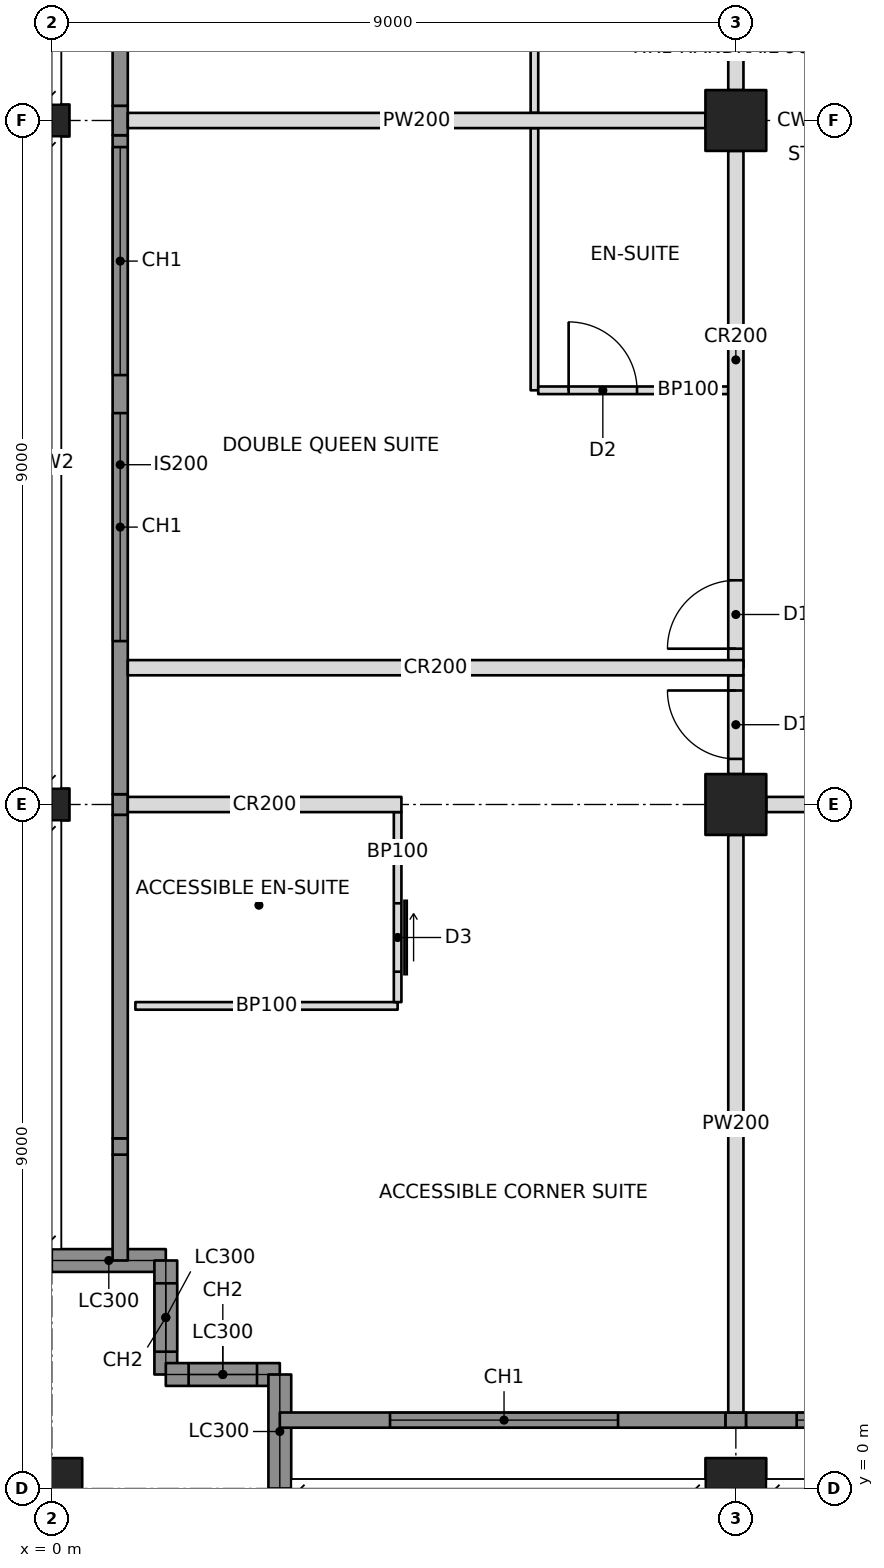
"""IFC4 building model, lengths in metres.
Left out: names, types, materials, properties, quantities, classifications, styles, units other than length and angle.
Written with IfcOpenShell. Run it as: python <this file> out.ifc"""

import sys

from ifc_helpers import new_model, si_unit, direction, frame, frame_2d, origin, origin_with_axes, origin_2d, place, context, subcontext, project, spatial, rectangle, hollow_rectangle, i_section, extrude, element, fill, save


model = new_model("IFC4")
c1 = context("Model", 3, precision=1e-05, world=origin(), true_north=direction((0.0, 1.0)))
c2 = subcontext(c1, "Body", "Model", "MODEL_VIEW")
j1 = project(units=[si_unit("LENGTHUNIT", "METRE"), si_unit("PLANEANGLEUNIT", "RADIAN")], contexts=[c1])
p1 = place(None, origin())
s1 = spatial("IfcSite", under=j1, at=p1, CompositionType="ELEMENT")
p2 = place(p1, origin())
s2 = spatial("IfcBuilding", under=s1, at=p2, CompositionType="ELEMENT")
p3 = place(p2, frame((0.0, 0.0, 226.6)))
s3 = spatial("IfcBuildingStorey", under=s2, at=p3, CompositionType="ELEMENT", Elevation=226.6)
p4 = place(p3, origin_with_axes())
e1 = element("IfcColumn", 1, at=p4, inside=s3, PredefinedType="COLUMN", context=c2, shape_type="SweptSolid", body=[
    extrude(hollow_rectangle(XDim=0.8, YDim=0.8, WallThickness=0.05, at=origin_2d()), origin(), (0.0, 0.0, 1.0), 3.6),
])
for number, where, z_axis, x_axis in (
    (2, (0.0, 9.0, 0.0), (0.0, 0.0, 1.0), (0.0, 1.0, 0.0)),
    (3, (0.0, 18.0, 0.0), (0.0, 0.0, 1.0), (0.0, 1.0, 0.0)),
):
    element("IfcColumn", number, at=place(p3, frame(where, z_axis=z_axis, x_axis=x_axis)), inside=s3, PredefinedType="COLUMN", context=c2, shape_type="SweptSolid", body=[
        extrude(i_section(OverallWidth=0.422, OverallDepth=0.465, WebThickness=0.045, FlangeThickness=0.073, at=origin_2d()), origin(), (0.0, 0.0, 1.0), 3.6),
    ])
p5 = place(p3, frame((9.0, 0.0, 0.0), z_axis=(0.0, 0.0, 1.0), x_axis=(1.0, 0.0, 0.0)))
e4 = element("IfcColumn", 4, at=p5, inside=s3, PredefinedType="COLUMN", context=c2, shape_type="SweptSolid", body=[
    extrude(hollow_rectangle(XDim=0.8, YDim=0.8, WallThickness=0.05, at=origin_2d()), origin(), (0.0, 0.0, 1.0), 3.6),
])
for number, where, z_axis, x_axis in (
    (5, (9.0, 9.0, 0.0), (0.0, 0.0, 1.0), (1.0, 0.0, 0.0)),
    (6, (9.0, 18.0, 0.0), (0.0, 0.0, 1.0), (1.0, 0.0, 0.0)),
):
    element("IfcColumn", number, at=place(p3, frame(where, z_axis=z_axis, x_axis=x_axis)), inside=s3, PredefinedType="COLUMN", context=c2, shape_type="SweptSolid", body=[
        extrude(hollow_rectangle(XDim=0.8, YDim=0.8, WallThickness=0.1, at=origin_2d()), origin(), (0.0, 0.0, 1.0), 3.6),
    ])
p6 = place(p3, frame((0.0, 3.0, 0.0), z_axis=(0.0, 0.0, 1.0), x_axis=(1.0, 0.0, 0.0)))
e7 = element("IfcWall", 7, at=p6, inside=s3, PredefinedType="SOLIDWALL", context=c2, shape_type="SweptSolid", body=[
    extrude(rectangle(XDim=1.5, YDim=0.3, at=frame_2d((0.75, 0.0))), origin(), (0.0, 0.0, 1.0), 2.62),
])
p7 = place(p3, frame((1.5, 3.0, 0.0), z_axis=(0.0, 0.0, 1.0), x_axis=(0.0, -1.0, 0.0)))
e8 = element("IfcWall", 8, at=p7, inside=s3, PredefinedType="SOLIDWALL", context=c2, shape_type="SweptSolid", body=[
    extrude(rectangle(XDim=1.5, YDim=0.3, at=frame_2d((0.75, 0.0))), origin(), (0.0, 0.0, 1.0), 3.4),
])
p8 = place(p7, frame((0.3, 0.0, 0.6)))
e9 = element("IfcOpeningElement", 9, at=p8, cuts=e8, PredefinedType="OPENING", context=c2, shape_type="SweptSolid", body=[
    extrude(rectangle(XDim=0.9, YDim=2.2, at=frame_2d((0.45, 1.1))), frame((0.0, 0.16, 0.0), z_axis=(0.0, -1.0, 0.0), x_axis=(1.0, 0.0, 0.0)), (0.0, 0.0, 1.0), 0.32),
])
p9 = place(p3, frame((1.5, 1.5, 0.0), z_axis=(0.0, 0.0, 1.0), x_axis=(1.0, 0.0, 0.0)))
e10 = element("IfcWall", 10, at=p9, inside=s3, PredefinedType="SOLIDWALL", context=c2, shape_type="SweptSolid", body=[
    extrude(rectangle(XDim=1.5, YDim=0.3, at=frame_2d((0.75, 0.0))), origin(), (0.0, 0.0, 1.0), 3.4),
])
p10 = place(p9, frame((0.3, 0.0, 0.6)))
e11 = element("IfcOpeningElement", 11, at=p10, cuts=e10, PredefinedType="OPENING", context=c2, shape_type="SweptSolid", body=[
    extrude(rectangle(XDim=0.9, YDim=2.2, at=frame_2d((0.45, 1.1))), frame((0.0, 0.16, 0.0), z_axis=(0.0, -1.0, 0.0), x_axis=(1.0, 0.0, 0.0)), (0.0, 0.0, 1.0), 0.32),
])
p11 = place(p3, frame((3.0, 1.5, 0.0), z_axis=(0.0, 0.0, 1.0), x_axis=(0.0, -1.0, 0.0)))
e12 = element("IfcWall", 12, at=p11, inside=s3, PredefinedType="SOLIDWALL", context=c2, shape_type="SweptSolid", body=[
    extrude(rectangle(XDim=1.5, YDim=0.3, at=frame_2d((0.75, 0.0))), origin(), (0.0, 0.0, 1.0), 2.62),
])
p12 = place(p3, frame((3.0, 0.9, 0.0), z_axis=(0.0, 0.0, 1.0), x_axis=(1.0, 0.0, 0.0)))
e13 = element("IfcWall", 13, at=p12, inside=s3, PredefinedType="SOLIDWALL", context=c2, shape_type="SweptSolid", body=[
    extrude(rectangle(XDim=5.865, YDim=0.2, at=frame_2d((2.932, 0.0))), origin(), (0.0, 0.0, 1.0), 3.4),
])
p13 = place(p12, frame((1.45, 0.0, 0.6)))
e14 = element("IfcOpeningElement", 14, at=p13, cuts=e13, PredefinedType="OPENING", context=c2, shape_type="SweptSolid", body=[
    extrude(rectangle(XDim=3.0, YDim=2.2, at=frame_2d((1.5, 1.1))), frame((0.0, 0.11, 0.0), z_axis=(0.0, -1.0, 0.0), x_axis=(1.0, 0.0, 0.0)), (0.0, 0.0, 1.0), 0.22),
])
p14 = place(p3, frame((0.9, 3.0, 0.0), z_axis=(0.0, 0.0, 1.0), x_axis=(0.0, 1.0, 0.0)))
e15 = element("IfcWall", 15, at=p14, inside=s3, PredefinedType="SOLIDWALL", context=c2, shape_type="SweptSolid", body=[
    extrude(rectangle(XDim=1.393, YDim=0.2, at=frame_2d((0.696, 0.0))), origin(), (0.0, 0.0, 1.0), 3.4),
])
p15 = place(p3, frame((1.0, 9.0, 0.0), z_axis=(0.0, 0.0, 1.0), x_axis=(1.0, 0.0, 0.0)))
e16 = element("IfcWall", 16, at=p15, inside=s3, PredefinedType="PARTITIONING", context=c2, shape_type="SweptSolid", body=[
    extrude(rectangle(XDim=3.6, YDim=0.2, at=frame_2d((1.8, 0.0))), origin(), (0.0, 0.0, 1.0), 2.638),
])
p16 = place(p3, frame((9.4, 9.0, 0.0), z_axis=(0.0, 0.0, 1.0), x_axis=(1.0, 0.0, 0.0)))
e17 = element("IfcWall", 17, at=p16, inside=s3, PredefinedType="PARTITIONING", context=c2, shape_type="SweptSolid", body=[
    extrude(rectangle(XDim=2.95, YDim=0.2, at=frame_2d((1.475, 0.0))), origin(), (0.0, 0.0, 1.0), 2.605),
])
p17 = place(p3, frame((9.0, 10.8, 0.0), z_axis=(0.0, 0.0, 1.0), x_axis=(0.0, 1.0, 0.0)))
e18 = element("IfcWall", 18, at=p17, inside=s3, PredefinedType="PARTITIONING", context=c2, shape_type="SweptSolid", body=[
    extrude(rectangle(XDim=6.8, YDim=0.2, at=frame_2d((3.4, 0.0))), origin(), (0.0, 0.0, 1.0), 2.605),
])
p18 = place(p17, frame((0.25, 0.0, 0.0)))
e19 = element("IfcOpeningElement", 19, at=p18, cuts=e18, PredefinedType="OPENING", context=c2, shape_type="SweptSolid", body=[
    extrude(rectangle(XDim=0.9, YDim=2.1, at=frame_2d((0.45, 1.05))), frame((0.0, 0.11, 0.0), z_axis=(0.0, -1.0, 0.0), x_axis=(1.0, 0.0, 0.0)), (0.0, 0.0, 1.0), 0.22),
])
p19 = place(p3, frame((9.0, 18.4, 0.0), z_axis=(0.0, 0.0, 1.0), x_axis=(0.0, 1.0, 0.0)))
e20 = element("IfcWall", 20, at=p19, inside=s3, PredefinedType="PARTITIONING", context=c2, shape_type="SweptSolid", body=[
    extrude(rectangle(XDim=8.2, YDim=0.2, at=frame_2d((4.1, 0.0))), origin(), (0.0, 0.0, 1.0), 2.605),
])
p20 = place(p19, frame((5.65, 0.0, 0.0)))
e21 = element("IfcOpeningElement", 21, at=p20, cuts=e20, PredefinedType="OPENING", context=c2, shape_type="SweptSolid", body=[
    extrude(rectangle(XDim=0.9, YDim=2.1, at=frame_2d((0.45, 1.05))), frame((0.0, 0.11, 0.0), z_axis=(0.0, -1.0, 0.0), x_axis=(1.0, 0.0, 0.0)), (0.0, 0.0, 1.0), 0.22),
])
p21 = place(p3, frame((1.0, 10.8, 0.0), z_axis=(0.0, 0.0, 1.0), x_axis=(1.0, 0.0, 0.0)))
e22 = element("IfcWall", 22, at=p21, inside=s3, PredefinedType="PARTITIONING", context=c2, shape_type="SweptSolid", body=[
    extrude(rectangle(XDim=8.1, YDim=0.2, at=frame_2d((4.05, 0.0))), origin(), (0.0, 0.0, 1.0), 2.604),
])
p22 = place(p3, frame((9.0, 8.6, 0.0), z_axis=(0.0, 0.0, 1.0), x_axis=(0.0, -1.0, 0.0)))
e23 = element("IfcWall", 23, at=p22, inside=s3, PredefinedType="PARTITIONING", context=c2, shape_type="SweptSolid", body=[
    extrude(rectangle(XDim=7.6, YDim=0.2, at=frame_2d((3.8, 0.0))), origin(), (0.0, 0.0, 1.0), 2.638),
])
p23 = place(p3, frame((1.1, 6.35, 0.0), z_axis=(0.0, 0.0, 1.0), x_axis=(1.0, 0.0, 0.0)))
e24 = element("IfcWall", 24, at=p23, inside=s3, PredefinedType="PARTITIONING", context=c2, shape_type="SweptSolid", body=[
    extrude(rectangle(XDim=3.45, YDim=0.1, at=frame_2d((1.725, 0.0))), origin(), (0.0, 0.0, 1.0), 3.4),
])
p24 = place(p3, frame((4.55, 8.9, 0.0), z_axis=(0.0, 0.0, 1.0), x_axis=(0.0, -1.0, 0.0)))
e25 = element("IfcWall", 25, at=p24, inside=s3, PredefinedType="PARTITIONING", context=c2, shape_type="SweptSolid", body=[
    extrude(rectangle(XDim=2.5, YDim=0.1, at=frame_2d((1.25, 0.0))), origin(), (0.0, 0.0, 1.0), 2.638),
])
p25 = place(p24, frame((1.2, 0.0, 0.0)))
e26 = element("IfcOpeningElement", 26, at=p25, cuts=e25, PredefinedType="OPENING", context=c2, shape_type="SweptSolid", body=[
    extrude(rectangle(XDim=0.9, YDim=2.1, at=frame_2d((0.45, 1.05))), frame((0.0, 0.06, 0.0), z_axis=(0.0, -1.0, 0.0), x_axis=(1.0, 0.0, 0.0)), (0.0, 0.0, 1.0), 0.12),
])
p26 = place(p3, frame((8.6, 18.0, 0.0), z_axis=(0.0, 0.0, 1.0), x_axis=(-1.0, 0.0, 0.0)))
e27 = element("IfcWall", 27, at=p26, inside=s3, PredefinedType="PARTITIONING", context=c2, shape_type="SweptSolid", body=[
    extrude(rectangle(XDim=7.6, YDim=0.2, at=frame_2d((3.8, 0.0))), origin(), (0.0, 0.0, 1.0), 2.605),
])
p27 = place(p3, frame((6.35, 14.45, 0.0), z_axis=(0.0, 0.0, 1.0), x_axis=(0.0, 1.0, 0.0)))
e28 = element("IfcWall", 28, at=p27, inside=s3, PredefinedType="PARTITIONING", context=c2, shape_type="SweptSolid", body=[
    extrude(rectangle(XDim=3.45, YDim=0.1, at=frame_2d((1.725, 0.0))), origin(), (0.0, 0.0, 1.0), 2.604),
])
p28 = place(p3, frame((8.9, 14.45, 0.0), z_axis=(0.0, 0.0, 1.0), x_axis=(-1.0, 0.0, 0.0)))
e29 = element("IfcWall", 29, at=p28, inside=s3, PredefinedType="PARTITIONING", context=c2, shape_type="SweptSolid", body=[
    extrude(rectangle(XDim=2.5, YDim=0.1, at=frame_2d((1.25, 0.0))), origin(), (0.0, 0.0, 1.0), 2.604),
])
p29 = place(p28, frame((1.2, 0.0, 0.0)))
e30 = element("IfcOpeningElement", 30, at=p29, cuts=e29, PredefinedType="OPENING", context=c2, shape_type="SweptSolid", body=[
    extrude(rectangle(XDim=0.9, YDim=2.1, at=frame_2d((0.45, 1.05))), frame((0.0, 0.06, 0.0), z_axis=(0.0, -1.0, 0.0), x_axis=(1.0, 0.0, 0.0)), (0.0, 0.0, 1.0), 0.12),
])
p30 = place(p3, frame((6.35, 18.1, 0.0), z_axis=(0.0, 0.0, 1.0), x_axis=(0.0, 1.0, 0.0)))
e31 = element("IfcWall", 31, at=p30, inside=s3, PredefinedType="PARTITIONING", context=c2, shape_type="SweptSolid", body=[
    extrude(rectangle(XDim=3.45, YDim=0.1, at=frame_2d((1.725, 0.0))), origin(), (0.0, 0.0, 1.0), 2.604),
])
p31 = place(p3, frame((9.0, 9.4, 0.0), z_axis=(0.0, 0.0, 1.0), x_axis=(0.0, 1.0, 0.0)))
e32 = element("IfcWall", 32, at=p31, inside=s3, PredefinedType="PARTITIONING", context=c2, shape_type="SweptSolid", body=[
    extrude(rectangle(XDim=1.3, YDim=0.2, at=frame_2d((0.65, 0.0))), origin(), (0.0, 0.0, 1.0), 2.605),
])
p32 = place(p31, frame((0.2, 0.0, 0.0)))
e33 = element("IfcOpeningElement", 33, at=p32, cuts=e32, PredefinedType="OPENING", context=c2, shape_type="SweptSolid", body=[
    extrude(rectangle(XDim=0.9, YDim=2.1, at=frame_2d((0.45, 1.05))), frame((0.0, 0.11, 0.0), z_axis=(0.0, -1.0, 0.0), x_axis=(1.0, 0.0, 0.0)), (0.0, 0.0, 1.0), 0.22),
])
p33 = place(p3, frame((8.865, 0.9, 0.0), z_axis=(0.0, 0.0, 1.0), x_axis=(1.0, 0.0, 0.0)))
e34 = element("IfcWall", 34, at=p33, inside=s3, PredefinedType="SOLIDWALL", context=c2, shape_type="SweptSolid", body=[
    extrude(rectangle(XDim=0.271, YDim=0.2, at=frame_2d((0.135, 0.0))), origin(), (0.0, 0.0, 1.0), 2.638),
])
p34 = place(p3, frame((9.135, 0.9, 0.0), z_axis=(0.0, 0.0, 1.0), x_axis=(1.0, 0.0, 0.0)))
e35 = element("IfcWall", 35, at=p34, inside=s3, PredefinedType="SOLIDWALL", context=c2, shape_type="SweptSolid", body=[
    extrude(rectangle(XDim=8.671, YDim=0.2, at=frame_2d((4.335, 0.0))), origin(), (0.0, 0.0, 1.0), 3.4),
])
p35 = place(p34, frame((0.665, 0.0, 0.6)))
e36 = element("IfcOpeningElement", 36, at=p35, cuts=e35, PredefinedType="OPENING", context=c2, shape_type="SweptSolid", body=[
    extrude(rectangle(XDim=3.0, YDim=2.2, at=frame_2d((1.5, 1.1))), frame((0.0, 0.11, 0.0), z_axis=(0.0, -1.0, 0.0), x_axis=(1.0, 0.0, 0.0)), (0.0, 0.0, 1.0), 0.22),
])
p36 = place(p34, frame((5.065, 0.0, 0.6)))
e37 = element("IfcOpeningElement", 37, at=p36, cuts=e35, PredefinedType="OPENING", context=c2, shape_type="SweptSolid", body=[
    extrude(rectangle(XDim=3.0, YDim=2.2, at=frame_2d((1.5, 1.1))), frame((0.0, 0.11, 0.0), z_axis=(0.0, -1.0, 0.0), x_axis=(1.0, 0.0, 0.0)), (0.0, 0.0, 1.0), 0.22),
])
p37 = place(p3, frame((0.9, 4.393, 0.0), z_axis=(0.0, 0.0, 1.0), x_axis=(0.0, 1.0, 0.0)))
e38 = element("IfcWall", 38, at=p37, inside=s3, PredefinedType="SOLIDWALL", context=c2, shape_type="SweptSolid", body=[
    extrude(rectangle(XDim=0.215, YDim=0.2, at=frame_2d((0.107, 0.0))), origin(), (0.0, 0.0, 1.0), 2.861),
])
p38 = place(p3, frame((0.9, 4.607, 0.0), z_axis=(0.0, 0.0, 1.0), x_axis=(0.0, 1.0, 0.0)))
e39 = element("IfcWall", 39, at=p38, inside=s3, PredefinedType="SOLIDWALL", context=c2, shape_type="SweptSolid", body=[
    extrude(rectangle(XDim=4.257, YDim=0.2, at=frame_2d((2.129, 0.0))), origin(), (0.0, 0.0, 1.0), 3.4),
])
p39 = place(p3, frame((0.9, 8.865, 0.0), z_axis=(0.0, 0.0, 1.0), x_axis=(0.0, 1.0, 0.0)))
e40 = element("IfcWall", 40, at=p39, inside=s3, PredefinedType="SOLIDWALL", context=c2, shape_type="SweptSolid", body=[
    extrude(rectangle(XDim=0.271, YDim=0.2, at=frame_2d((0.135, 0.0))), origin(), (0.0, 0.0, 1.0), 2.638),
])
p40 = place(p3, frame((0.9, 9.135, 0.0), z_axis=(0.0, 0.0, 1.0), x_axis=(0.0, 1.0, 0.0)))
e41 = element("IfcWall", 41, at=p40, inside=s3, PredefinedType="SOLIDWALL", context=c2, shape_type="SweptSolid", body=[
    extrude(rectangle(XDim=8.671, YDim=0.2, at=frame_2d((4.335, 0.0))), origin(), (0.0, 0.0, 1.0), 3.4),
])
p41 = place(p40, frame((2.015, 0.0, 0.6)))
e42 = element("IfcOpeningElement", 42, at=p41, cuts=e41, PredefinedType="OPENING", context=c2, shape_type="SweptSolid", body=[
    extrude(rectangle(XDim=3.0, YDim=2.2, at=frame_2d((1.5, 1.1))), frame((0.0, 0.11, 0.0), z_axis=(0.0, -1.0, 0.0), x_axis=(1.0, 0.0, 0.0)), (0.0, 0.0, 1.0), 0.22),
])
p42 = place(p40, frame((5.515, 0.0, 0.6)))
e43 = element("IfcOpeningElement", 43, at=p42, cuts=e41, PredefinedType="OPENING", context=c2, shape_type="SweptSolid", body=[
    extrude(rectangle(XDim=3.0, YDim=2.2, at=frame_2d((1.5, 1.1))), frame((0.0, 0.11, 0.0), z_axis=(0.0, -1.0, 0.0), x_axis=(1.0, 0.0, 0.0)), (0.0, 0.0, 1.0), 0.22),
])
p43 = place(p3, frame((0.9, 17.806, 0.0), z_axis=(0.0, 0.0, 1.0), x_axis=(0.0, 1.0, 0.0)))
e44 = element("IfcWall", 44, at=p43, inside=s3, PredefinedType="SOLIDWALL", context=c2, shape_type="SweptSolid", body=[
    extrude(rectangle(XDim=0.388, YDim=0.2, at=frame_2d((0.194, 0.0))), origin(), (0.0, 0.0, 1.0), 2.604),
])
p44 = place(p3, frame((0.9, 18.194, 0.0), z_axis=(0.0, 0.0, 1.0), x_axis=(0.0, 1.0, 0.0)))
e45 = element("IfcWall", 45, at=p44, inside=s3, PredefinedType="SOLIDWALL", context=c2, shape_type="SweptSolid", body=[
    extrude(rectangle(XDim=5.806, YDim=0.2, at=frame_2d((2.903, 0.0))), origin(), (0.0, 0.0, 1.0), 3.4),
])
p45 = place(p44, frame((1.356, 0.0, 0.6)))
e46 = element("IfcOpeningElement", 46, at=p45, cuts=e45, PredefinedType="OPENING", context=c2, shape_type="SweptSolid", body=[
    extrude(rectangle(XDim=3.0, YDim=2.2, at=frame_2d((1.5, 1.1))), frame((0.0, 0.11, 0.0), z_axis=(0.0, -1.0, 0.0), x_axis=(1.0, 0.0, 0.0)), (0.0, 0.0, 1.0), 0.22),
])
p46 = place(p8, origin())
e47 = element("IfcWindow", 47, at=p46, inside=s3, PartitioningType="SINGLE_PANEL", PredefinedType="WINDOW", context=c2, shape_type="SweptSolid", body=[
    extrude(rectangle(XDim=0.9, YDim=2.2, at=frame_2d((0.45, 1.1))), frame((0.0, 0.03, 0.0), z_axis=(0.0, -1.0, 0.0), x_axis=(1.0, 0.0, 0.0)), (0.0, 0.0, 1.0), 0.06),
])
fill(e9, e47)
p47 = place(p10, origin())
e48 = element("IfcWindow", 48, at=p47, inside=s3, PartitioningType="SINGLE_PANEL", PredefinedType="WINDOW", context=c2, shape_type="SweptSolid", body=[
    extrude(rectangle(XDim=0.9, YDim=2.2, at=frame_2d((0.45, 1.1))), frame((0.0, 0.03, 0.0), z_axis=(0.0, -1.0, 0.0), x_axis=(1.0, 0.0, 0.0)), (0.0, 0.0, 1.0), 0.06),
])
fill(e11, e48)
p48 = place(p13, origin())
e49 = element("IfcWindow", 49, at=p48, inside=s3, PartitioningType="TRIPLE_PANEL_VERTICAL", PredefinedType="WINDOW", context=c2, shape_type="SweptSolid", body=[
    extrude(rectangle(XDim=3.0, YDim=2.2, at=frame_2d((1.5, 1.1))), frame((0.0, 0.03, 0.0), z_axis=(0.0, -1.0, 0.0), x_axis=(1.0, 0.0, 0.0)), (0.0, 0.0, 1.0), 0.06),
])
fill(e14, e49)
p49 = place(p35, origin())
e50 = element("IfcWindow", 50, at=p49, inside=s3, PartitioningType="TRIPLE_PANEL_VERTICAL", PredefinedType="WINDOW", context=c2, shape_type="SweptSolid", body=[
    extrude(rectangle(XDim=3.0, YDim=2.2, at=frame_2d((1.5, 1.1))), frame((0.0, 0.03, 0.0), z_axis=(0.0, -1.0, 0.0), x_axis=(1.0, 0.0, 0.0)), (0.0, 0.0, 1.0), 0.06),
])
fill(e36, e50)
p50 = place(p41, origin())
e51 = element("IfcWindow", 51, at=p50, inside=s3, PartitioningType="TRIPLE_PANEL_VERTICAL", PredefinedType="WINDOW", context=c2, shape_type="SweptSolid", body=[
    extrude(rectangle(XDim=3.0, YDim=2.2, at=frame_2d((1.5, 1.1))), frame((0.0, 0.03, 0.0), z_axis=(0.0, -1.0, 0.0), x_axis=(1.0, 0.0, 0.0)), (0.0, 0.0, 1.0), 0.06),
])
fill(e42, e51)
p51 = place(p42, origin())
e52 = element("IfcWindow", 52, at=p51, inside=s3, PartitioningType="TRIPLE_PANEL_VERTICAL", PredefinedType="WINDOW", context=c2, shape_type="SweptSolid", body=[
    extrude(rectangle(XDim=3.0, YDim=2.2, at=frame_2d((1.5, 1.1))), frame((0.0, 0.03, 0.0), z_axis=(0.0, -1.0, 0.0), x_axis=(1.0, 0.0, 0.0)), (0.0, 0.0, 1.0), 0.06),
])
fill(e43, e52)
p52 = place(p25, origin())
e53 = element("IfcDoor", 53, at=p52, inside=s3, OperationType="SLIDING_TO_LEFT", PredefinedType="DOOR", context=c2, shape_type="SweptSolid", body=[
    extrude(rectangle(XDim=0.9, YDim=2.1, at=frame_2d((0.45, 1.05))), frame((0.0, 0.025, 0.0), z_axis=(0.0, -1.0, 0.0), x_axis=(1.0, 0.0, 0.0)), (0.0, 0.0, 1.0), 0.05),
])
fill(e26, e53)
p53 = place(p29, frame((0.9, 0.0, 0.0), z_axis=(0.0, 0.0, 1.0), x_axis=(-1.0, 0.0, 0.0)))
e54 = element("IfcDoor", 54, at=p53, inside=s3, OperationType="SINGLE_SWING_LEFT", PredefinedType="DOOR", context=c2, shape_type="SweptSolid", body=[
    extrude(rectangle(XDim=0.9, YDim=2.1, at=frame_2d((0.45, 1.05))), frame((0.0, 0.025, 0.0), z_axis=(0.0, -1.0, 0.0), x_axis=(1.0, 0.0, 0.0)), (0.0, 0.0, 1.0), 0.05),
])
fill(e30, e54)
p54 = place(p18, origin())
e55 = element("IfcDoor", 55, at=p54, inside=s3, OperationType="SINGLE_SWING_LEFT", PredefinedType="DOOR", context=c2, shape_type="SweptSolid", body=[
    extrude(rectangle(XDim=0.9, YDim=2.1, at=frame_2d((0.45, 1.05))), frame((0.0, 0.025, 0.0), z_axis=(0.0, -1.0, 0.0), x_axis=(1.0, 0.0, 0.0)), (0.0, 0.0, 1.0), 0.05),
])
fill(e19, e55)
p55 = place(p32, origin())
e56 = element("IfcDoor", 56, at=p55, inside=s3, OperationType="SINGLE_SWING_RIGHT", PredefinedType="DOOR", context=c2, shape_type="SweptSolid", body=[
    extrude(rectangle(XDim=0.9, YDim=2.1, at=frame_2d((0.45, 1.05))), frame((0.0, 0.025, 0.0), z_axis=(0.0, -1.0, 0.0), x_axis=(1.0, 0.0, 0.0)), (0.0, 0.0, 1.0), 0.05),
])
fill(e33, e56)
save(model, sys.argv[1])
